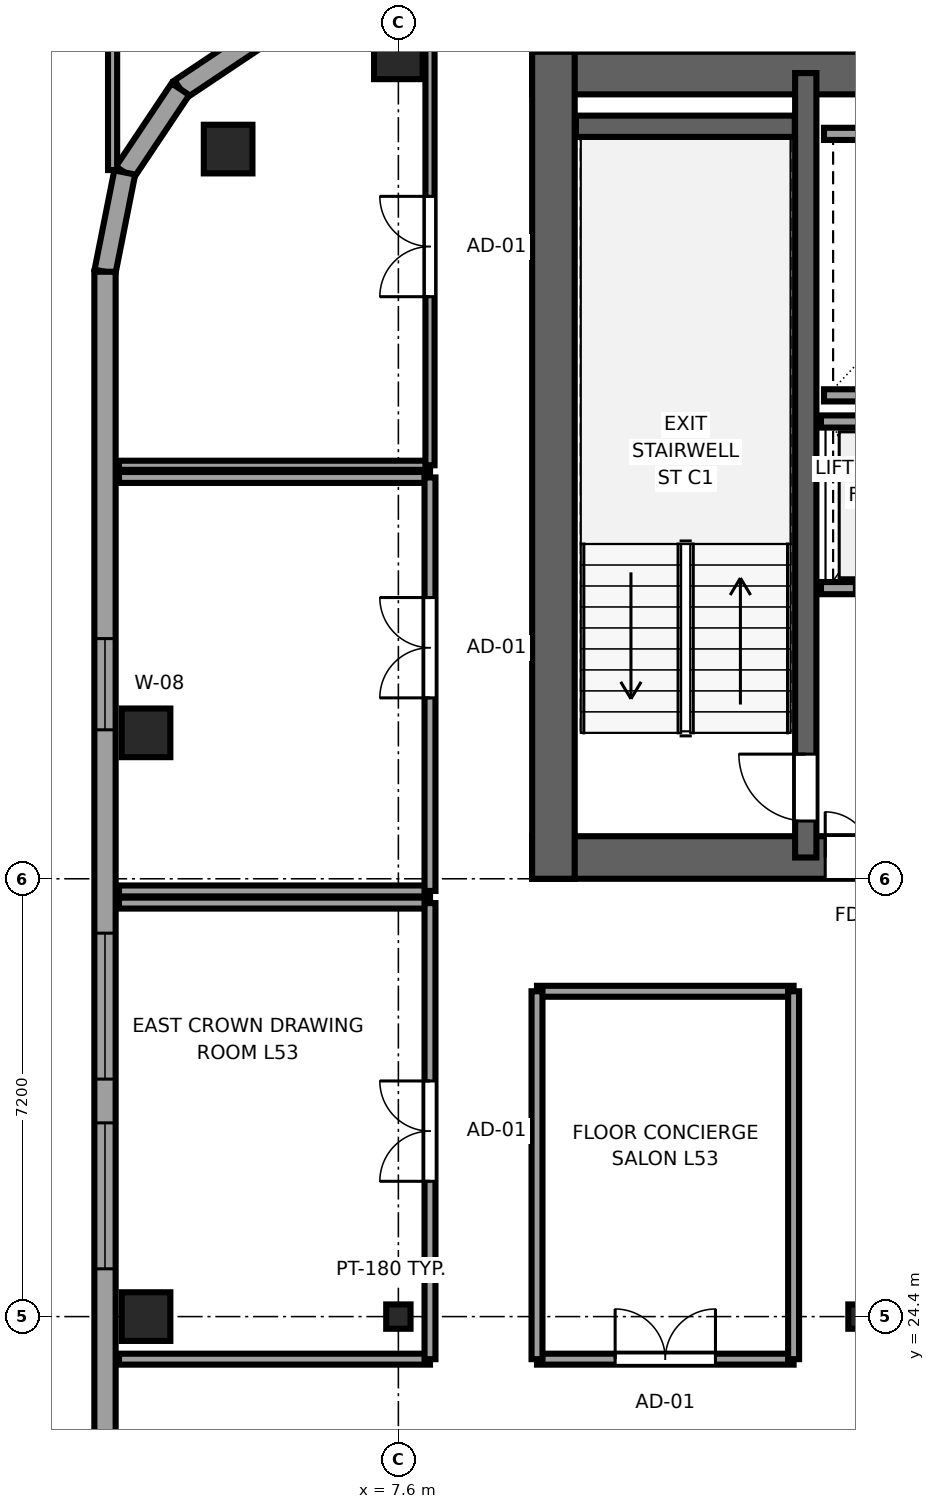
"""IFC4 building model, lengths in metres.
Left out: names, types, materials, properties, quantities, classifications, styles, units other than length and angle.
Written with IfcOpenShell. Run it as: python <this file> out.ifc"""

import sys

from ifc_helpers import new_model, si_unit, direction, frame, frame_2d, origin, origin_2d, place, context, subcontext, project, spatial, rectangle, i_section, extrude, source, transform, mapped, element, fill, save


model = new_model("IFC4")
c1 = context("Model", 3, precision=1e-05, world=origin(), true_north=direction((0.0, 1.0)))
c2 = subcontext(c1, "Body", "Model", "MODEL_VIEW")
j1 = project(units=[si_unit("LENGTHUNIT", "METRE"), si_unit("PLANEANGLEUNIT", "RADIAN")], contexts=[c1])
p1 = place(None, origin())
s1 = spatial("IfcSite", under=j1, at=p1, CompositionType="ELEMENT")
p2 = place(p1, origin())
s2 = spatial("IfcBuilding", under=s1, at=p2, CompositionType="ELEMENT")
p3 = place(p2, frame((0.0, 0.0, 201.75)))
s3 = spatial("IfcBuildingStorey", under=s2, at=p3, CompositionType="ELEMENT", Elevation=201.75)
p4 = place(p3, frame((9.8, 31.95, 0.0), z_axis=(0.0, 0.0, 1.0), x_axis=(1.0, 0.0, 0.0)))
e1 = element("IfcWall", 1, at=p4, inside=s3, PredefinedType="SHEAR", context=c2, shape_type="SweptSolid", body=[
    extrude(rectangle(XDim=26.4, YDim=0.7, at=frame_2d((13.2, 0.0))), origin(), (0.0, 0.0, 1.0), 3.55),
])
p5 = place(p4, frame((6.32, 0.0, 0.0), z_axis=(0.0, 0.0, 1.0), x_axis=(-1.0, 0.0, 0.0)))
e2 = element("IfcOpeningElement", 2, at=p5, cuts=e1, PredefinedType="OPENING", context=c2, shape_type="SweptSolid", body=[
    extrude(rectangle(XDim=1.5, YDim=2.04, at=frame_2d((0.75, 1.02))), frame((0.0, 0.36, 0.0), z_axis=(0.0, -1.0, 0.0), x_axis=(1.0, 0.0, 0.0)), (0.0, 0.0, 1.0), 0.72),
])
p6 = place(p4, frame((13.95, 0.0, 0.0), z_axis=(0.0, 0.0, 1.0), x_axis=(-1.0, 0.0, 0.0)))
e3 = element("IfcOpeningElement", 3, at=p6, cuts=e1, PredefinedType="OPENING", context=c2, shape_type="SweptSolid", body=[
    extrude(rectangle(XDim=1.5, YDim=2.04, at=frame_2d((0.75, 1.02))), frame((0.0, 0.36, 0.0), z_axis=(0.0, -1.0, 0.0), x_axis=(1.0, 0.0, 0.0)), (0.0, 0.0, 1.0), 0.72),
])
p7 = place(p4, frame((21.58, 0.0, 0.0), z_axis=(0.0, 0.0, 1.0), x_axis=(-1.0, 0.0, 0.0)))
e4 = element("IfcOpeningElement", 4, at=p7, cuts=e1, PredefinedType="OPENING", context=c2, shape_type="SweptSolid", body=[
    extrude(rectangle(XDim=1.5, YDim=2.04, at=frame_2d((0.75, 1.02))), frame((0.0, 0.36, 0.0), z_axis=(0.0, -1.0, 0.0), x_axis=(1.0, 0.0, 0.0)), (0.0, 0.0, 1.0), 0.72),
])
p8 = place(p4, frame((8.37, 0.0, 0.0), z_axis=(0.0, 0.0, 1.0), x_axis=(-1.0, 0.0, 0.0)))
e5 = element("IfcOpeningElement", 5, at=p8, cuts=e1, PredefinedType="OPENING", context=c2, shape_type="SweptSolid", body=[
    extrude(rectangle(XDim=0.82, YDim=2.01, at=frame_2d((0.41, 1.005))), frame((0.0, 0.36, 0.0), z_axis=(0.0, -1.0, 0.0), x_axis=(1.0, 0.0, 0.0)), (0.0, 0.0, 1.0), 0.72),
])
p9 = place(p4, frame((18.87, 0.0, 0.0), z_axis=(0.0, 0.0, 1.0), x_axis=(-1.0, 0.0, 0.0)))
e6 = element("IfcOpeningElement", 6, at=p9, cuts=e1, PredefinedType="OPENING", context=c2, shape_type="SweptSolid", body=[
    extrude(rectangle(XDim=0.82, YDim=2.01, at=frame_2d((0.41, 1.005))), frame((0.0, 0.36, 0.0), z_axis=(0.0, -1.0, 0.0), x_axis=(1.0, 0.0, 0.0)), (0.0, 0.0, 1.0), 0.72),
])
p10 = place(p3, frame((9.8, 44.85, 0.0), z_axis=(0.0, 0.0, 1.0), x_axis=(1.0, 0.0, 0.0)))
e7 = element("IfcWall", 7, at=p10, inside=s3, PredefinedType="SHEAR", context=c2, shape_type="SweptSolid", body=[
    extrude(rectangle(XDim=26.4, YDim=0.7, at=frame_2d((13.2, 0.0))), origin(), (0.0, 0.0, 1.0), 3.55),
])
p11 = place(p3, frame((10.15, 31.6, 0.0), z_axis=(0.0, 0.0, 1.0), x_axis=(0.0, 1.0, 0.0)))
e8 = element("IfcWall", 8, at=p11, inside=s3, PredefinedType="SHEAR", context=c2, shape_type="SweptSolid", body=[
    extrude(rectangle(XDim=13.6, YDim=0.7, at=frame_2d((6.8, 0.0))), origin(), (0.0, 0.0, 1.0), 3.55),
])
p12 = place(p3, frame((14.3, 31.95, 0.0), z_axis=(0.0, 0.0, 1.0), x_axis=(0.0, 1.0, 0.0)))
e9 = element("IfcWall", 9, at=p12, inside=s3, PredefinedType="SHEAR", context=c2, shape_type="SweptSolid", body=[
    extrude(rectangle(XDim=12.9, YDim=0.35, at=frame_2d((6.45, 0.0))), origin(), (0.0, 0.0, 1.0), 3.55),
])
p13 = place(p12, frame((0.6, 0.0, 0.0)))
e10 = element("IfcOpeningElement", 10, at=p13, cuts=e9, PredefinedType="OPENING", context=c2, shape_type="SweptSolid", body=[
    extrude(rectangle(XDim=1.1, YDim=2.12, at=frame_2d((0.55, 1.06))), frame((0.0, 0.185, 0.0), z_axis=(0.0, -1.0, 0.0), x_axis=(1.0, 0.0, 0.0)), (0.0, 0.0, 1.0), 0.37),
])
p14 = place(p3, frame((10.52, 43.975, 0.0), z_axis=(0.0, 0.0, 1.0), x_axis=(1.0, 0.0, 0.0)))
e11 = element("IfcWall", 11, at=p14, inside=s3, PredefinedType="SHEAR", context=c2, shape_type="SweptSolid", body=[
    extrude(rectangle(XDim=3.6, YDim=0.35, at=frame_2d((1.8, 0.0))), origin(), (0.0, 0.0, 1.0), 3.55),
])
m1 = source(origin(), c2, "Body", "SweptSolid", [
    extrude(rectangle(XDim=0.8, YDim=0.8, at=origin_2d()), origin(), (0.0, 0.0, 1.0), 3.55),
])
p15 = place(p3, frame((3.45, 24.4, 0.0), z_axis=(0.0, 0.0, 1.0), x_axis=(1.0, 0.0, 0.0)))
e12 = element("IfcColumn", 12, at=p15, inside=s3, PredefinedType="COLUMN", context=c2, shape_type="MappedRepresentation", body=[
    mapped(m1, transform((0.0, 0.0, 0.0), x_axis=(1.0, 0.0, 0.0), y_axis=(0.0, 1.0, 0.0), z_axis=(0.0, 0.0, 1.0), scale=1.0)),
])
m2 = source(origin(), c2, "Body", "SweptSolid", [
    extrude(i_section(OverallWidth=0.4, OverallDepth=0.4, WebThickness=0.02, FlangeThickness=0.035, at=origin_2d()), origin(), (0.0, 0.0, 1.0), 3.55),
])
for number, where, z_axis, x_axis in (
    (13, (7.6, 24.4, 0.0), (0.0, 0.0, 1.0), (1.0, 0.0, 0.0)),
    (14, (15.2, 24.4, 0.0), (0.0, 0.0, 1.0), (1.0, 0.0, 0.0)),
):
    element("IfcColumn", number, at=place(p3, frame(where, z_axis=z_axis, x_axis=x_axis)), inside=s3, PredefinedType="COLUMN", context=c2, shape_type="MappedRepresentation", body=[
        mapped(m2, transform((0.0, 0.0, 0.0), x_axis=(1.0, 0.0, 0.0), y_axis=(0.0, 1.0, 0.0), z_axis=(0.0, 0.0, 1.0), scale=1.0)),
    ])
for number, where, z_axis, x_axis in (
    (15, (4.8, 43.6, 0.0), (0.0, 0.0, 1.0), (1.0, 0.0, 0.0)),
    (16, (7.6, 45.15, 0.0), (0.0, 0.0, 1.0), (1.0, 0.0, 0.0)),
    (17, (3.45, 34.0, 0.0), (0.0, 0.0, 1.0), (1.0, 0.0, 0.0)),
):
    element("IfcColumn", number, at=place(p3, frame(where, z_axis=z_axis, x_axis=x_axis)), inside=s3, PredefinedType="COLUMN", context=c2, shape_type="MappedRepresentation", body=[
        mapped(m1, transform((0.0, 0.0, 0.0), x_axis=(1.0, 0.0, 0.0), y_axis=(0.0, 1.0, 0.0), z_axis=(0.0, 0.0, 1.0), scale=1.0)),
    ])
for number, where, z_axis, x_axis in (
    (18, (5.385, 45.5, 0.0), (0.0, 0.0, 1.0), (-0.832, -0.556, 0.0)),
    (19, (4.015, 44.585, 0.0), (0.0, 0.0, 1.0), (-0.556, -0.831, 0.0)),
):
    element("IfcWall", number, at=place(p3, frame(where, z_axis=z_axis, x_axis=x_axis)), inside=s3, PredefinedType="SOLIDWALL", context=c2, shape_type="SweptSolid", body=[
        extrude(rectangle(XDim=1.647, YDim=0.35, at=frame_2d((0.824, 0.0))), origin(), (0.0, 0.0, 1.0), 2.752),
    ])
p16 = place(p3, frame((3.1, 43.216, 0.0), z_axis=(0.0, 0.0, 1.0), x_axis=(-0.195044345786, -0.980794424524, 0.0)))
e20 = element("IfcWall", 20, at=p16, inside=s3, PredefinedType="SOLIDWALL", context=c2, shape_type="SweptSolid", body=[
    extrude(rectangle(XDim=1.665, YDim=0.35, at=frame_2d((0.833, 0.0))), origin(), (0.0, 0.0, 1.0), 3.29),
])
p17 = place(p3, frame((2.775, 41.583, 0.0), z_axis=(0.0, 0.0, 1.0), x_axis=(0.0, -1.0, 0.0)))
e21 = element("IfcWall", 21, at=p17, inside=s3, PredefinedType="SOLIDWALL", context=c2, shape_type="SweptSolid", body=[
    extrude(rectangle(XDim=34.566, YDim=0.35, at=frame_2d((17.283, 0.0))), origin(), (0.0, 0.0, 1.0), 3.29),
])
p18 = place(p17, frame((10.877, 0.0, 0.68)))
e22 = element("IfcOpeningElement", 22, at=p18, cuts=e21, PredefinedType="OPENING", context=c2, shape_type="SweptSolid", body=[
    extrude(rectangle(XDim=2.4, YDim=1.9, at=frame_2d((1.2, 0.95))), frame((0.0, 0.185, 0.0), z_axis=(0.0, -1.0, 0.0), x_axis=(1.0, 0.0, 0.0)), (0.0, 0.0, 1.0), 0.37),
])
p19 = place(p17, frame((13.997, 0.0, 0.68)))
e23 = element("IfcOpeningElement", 23, at=p19, cuts=e21, PredefinedType="OPENING", context=c2, shape_type="SweptSolid", body=[
    extrude(rectangle(XDim=2.4, YDim=1.9, at=frame_2d((1.2, 0.95))), frame((0.0, 0.185, 0.0), z_axis=(0.0, -1.0, 0.0), x_axis=(1.0, 0.0, 0.0)), (0.0, 0.0, 1.0), 0.37),
])
p20 = place(p17, frame((22.339, 0.0, 0.68)))
e24 = element("IfcOpeningElement", 24, at=p20, cuts=e21, PredefinedType="OPENING", context=c2, shape_type="SweptSolid", body=[
    extrude(rectangle(XDim=2.4, YDim=1.9, at=frame_2d((1.2, 0.95))), frame((0.0, 0.185, 0.0), z_axis=(0.0, -1.0, 0.0), x_axis=(1.0, 0.0, 0.0)), (0.0, 0.0, 1.0), 0.37),
])
p21 = place(p17, frame((26.51, 0.0, 0.68)))
e25 = element("IfcOpeningElement", 25, at=p21, cuts=e21, PredefinedType="OPENING", context=c2, shape_type="SweptSolid", body=[
    extrude(rectangle(XDim=2.4, YDim=1.9, at=frame_2d((1.2, 0.95))), frame((0.0, 0.185, 0.0), z_axis=(0.0, -1.0, 0.0), x_axis=(1.0, 0.0, 0.0)), (0.0, 0.0, 1.0), 0.37),
])
p22 = place(p17, frame((30.13, 0.0, 0.68)))
e26 = element("IfcOpeningElement", 26, at=p22, cuts=e21, PredefinedType="OPENING", context=c2, shape_type="SweptSolid", body=[
    extrude(rectangle(XDim=2.4, YDim=1.9, at=frame_2d((1.2, 0.95))), frame((0.0, 0.185, 0.0), z_axis=(0.0, -1.0, 0.0), x_axis=(1.0, 0.0, 0.0)), (0.0, 0.0, 1.0), 0.37),
])
p23 = place(p17, frame((6.033, 0.0, 0.62)))
e27 = element("IfcOpeningElement", 27, at=p23, cuts=e21, PredefinedType="OPENING", context=c2, shape_type="SweptSolid", body=[
    extrude(rectangle(XDim=1.5, YDim=1.55, at=frame_2d((0.75, 0.775))), frame((0.0, 0.185, 0.0), z_axis=(0.0, -1.0, 0.0), x_axis=(1.0, 0.0, 0.0)), (0.0, 0.0, 1.0), 0.37),
])
for number, where, z_axis, x_axis in (
    (28, (14.6, 39.55, 0.0), (0.0, 0.0, 1.0), (1.0, 0.0, 0.0)),
    (29, (14.6, 43.85, 0.0), (0.0, 0.0, 1.0), (1.0, 0.0, 0.0)),
):
    element("IfcWall", number, at=place(p3, frame(where, z_axis=z_axis, x_axis=x_axis)), inside=s3, PredefinedType="SOLIDWALL", context=c2, shape_type="SweptSolid", body=[
        extrude(rectangle(XDim=4.1, YDim=0.2, at=frame_2d((2.05, 0.0))), origin(), (0.0, 0.0, 1.0), 3.29),
    ])
p24 = place(p3, frame((14.55, 36.38, 0.0), z_axis=(0.0, 0.0, 1.0), x_axis=(1.0, 0.0, 0.0)))
e30 = element("IfcWall", 30, at=p24, inside=s3, PredefinedType="SOLIDWALL", context=c2, shape_type="SweptSolid", body=[
    extrude(rectangle(XDim=4.075, YDim=0.2, at=frame_2d((2.038, 0.0))), origin(), (0.0, 0.0, 1.0), 3.29),
])
p25 = place(p24, frame((0.55, 0.0, 0.0)))
e31 = element("IfcOpeningElement", 31, at=p25, cuts=e30, PredefinedType="OPENING", context=c2, shape_type="SweptSolid", body=[
    extrude(rectangle(XDim=1.1, YDim=2.12, at=frame_2d((0.55, 1.06))), frame((0.0, 0.11, 0.0), z_axis=(0.0, -1.0, 0.0), x_axis=(1.0, 0.0, 0.0)), (0.0, 0.0, 1.0), 0.22),
])
p26 = place(p24, frame((2.45, 0.0, 0.0)))
e32 = element("IfcOpeningElement", 32, at=p26, cuts=e30, PredefinedType="OPENING", context=c2, shape_type="SweptSolid", body=[
    extrude(rectangle(XDim=1.1, YDim=2.12, at=frame_2d((0.55, 1.06))), frame((0.0, 0.11, 0.0), z_axis=(0.0, -1.0, 0.0), x_axis=(1.0, 0.0, 0.0)), (0.0, 0.0, 1.0), 0.22),
])
p27 = place(p3, frame((14.55, 39.12, 0.0), z_axis=(0.0, 0.0, 1.0), x_axis=(1.0, 0.0, 0.0)))
e33 = element("IfcWall", 33, at=p27, inside=s3, PredefinedType="SOLIDWALL", context=c2, shape_type="SweptSolid", body=[
    extrude(rectangle(XDim=4.075, YDim=0.2, at=frame_2d((2.038, 0.0))), origin(), (0.0, 0.0, 1.0), 3.29),
])
for number, where, z_axis, x_axis in (
    (34, (3.005, 23.7, 0.0), (0.0, 0.0, 1.0), (1.0, 0.0, 0.0)),
    (35, (3.005, 31.2, 0.0), (0.0, 0.0, 1.0), (1.0, 0.0, 0.0)),
):
    element("IfcWall", number, at=place(p3, frame(where, z_axis=z_axis, x_axis=x_axis)), inside=s3, PredefinedType="PARTITIONING", context=c2, shape_type="SweptSolid", body=[
        extrude(rectangle(XDim=5.115, YDim=0.18, at=frame_2d((2.558, 0.0))), origin(), (0.0, 0.0, 1.0), 3.29),
    ])
p28 = place(p3, frame((8.12, 23.7, 0.0), z_axis=(0.0, 0.0, 1.0), x_axis=(0.0, 1.0, 0.0)))
e36 = element("IfcWall", 36, at=p28, inside=s3, PredefinedType="PARTITIONING", context=c2, shape_type="SweptSolid", body=[
    extrude(rectangle(XDim=7.5, YDim=0.18, at=frame_2d((3.75, 0.0))), origin(), (0.0, 0.0, 1.0), 3.29),
])
p29 = place(p28, frame((2.925, 0.0, 0.0)))
e37 = element("IfcOpeningElement", 37, at=p29, cuts=e36, PredefinedType="OPENING", context=c2, shape_type="SweptSolid", body=[
    extrude(rectangle(XDim=1.65, YDim=2.15, at=frame_2d((0.825, 1.075))), frame((0.0, 0.1, 0.0), z_axis=(0.0, -1.0, 0.0), x_axis=(1.0, 0.0, 0.0)), (0.0, 0.0, 1.0), 0.2),
])
for number, where, z_axis, x_axis in (
    (38, (3.005, 31.4, 0.0), (0.0, 0.0, 1.0), (1.0, 0.0, 0.0)),
    (39, (3.005, 38.2, 0.0), (0.0, 0.0, 1.0), (1.0, 0.0, 0.0)),
):
    element("IfcWall", number, at=place(p3, frame(where, z_axis=z_axis, x_axis=x_axis)), inside=s3, PredefinedType="PARTITIONING", context=c2, shape_type="SweptSolid", body=[
        extrude(rectangle(XDim=5.115, YDim=0.18, at=frame_2d((2.558, 0.0))), origin(), (0.0, 0.0, 1.0), 3.29),
    ])
p30 = place(p3, frame((8.12, 31.4, 0.0), z_axis=(0.0, 0.0, 1.0), x_axis=(0.0, 1.0, 0.0)))
e40 = element("IfcWall", 40, at=p30, inside=s3, PredefinedType="PARTITIONING", context=c2, shape_type="SweptSolid", body=[
    extrude(rectangle(XDim=6.8, YDim=0.18, at=frame_2d((3.4, 0.0))), origin(), (0.0, 0.0, 1.0), 3.29),
])
p31 = place(p30, frame((3.175, 0.0, 0.0)))
e41 = element("IfcOpeningElement", 41, at=p31, cuts=e40, PredefinedType="OPENING", context=c2, shape_type="SweptSolid", body=[
    extrude(rectangle(XDim=1.65, YDim=2.15, at=frame_2d((0.825, 1.075))), frame((0.0, 0.1, 0.0), z_axis=(0.0, -1.0, 0.0), x_axis=(1.0, 0.0, 0.0)), (0.0, 0.0, 1.0), 0.2),
])
p32 = place(p3, frame((3.005, 38.4, 0.0), z_axis=(0.0, 0.0, 1.0), x_axis=(1.0, 0.0, 0.0)))
e42 = element("IfcWall", 42, at=p32, inside=s3, PredefinedType="PARTITIONING", context=c2, shape_type="SweptSolid", body=[
    extrude(rectangle(XDim=5.115, YDim=0.15, at=frame_2d((2.558, 0.0))), origin(), (0.0, 0.0, 1.0), 3.29),
])
p33 = place(p3, frame((2.9, 43.255, 0.0), z_axis=(0.0, 0.0, 1.0), x_axis=(0.0, 1.0, 0.0)))
e43 = element("IfcWall", 43, at=p33, inside=s3, PredefinedType="PARTITIONING", context=c2, shape_type="SweptSolid", body=[
    extrude(rectangle(XDim=2.445, YDim=0.15, at=frame_2d((1.223, 0.0))), origin(), (0.0, 0.0, 1.0), 3.29),
])
p34 = place(p3, frame((8.12, 38.4, 0.0), z_axis=(0.0, 0.0, 1.0), x_axis=(0.0, 1.0, 0.0)))
e44 = element("IfcWall", 44, at=p34, inside=s3, PredefinedType="PARTITIONING", context=c2, shape_type="SweptSolid", body=[
    extrude(rectangle(XDim=7.195, YDim=0.15, at=frame_2d((3.598, 0.0))), origin(), (0.0, 0.0, 1.0), 3.29),
])
p35 = place(p34, frame((2.772, 0.0, 0.0)))
e45 = element("IfcOpeningElement", 45, at=p35, cuts=e44, PredefinedType="OPENING", context=c2, shape_type="SweptSolid", body=[
    extrude(rectangle(XDim=1.65, YDim=2.15, at=frame_2d((0.825, 1.075))), frame((0.0, 0.085, 0.0), z_axis=(0.0, -1.0, 0.0), x_axis=(1.0, 0.0, 0.0)), (0.0, 0.0, 1.0), 0.17),
])
p36 = place(p3, frame((9.88, 23.7, 0.0), z_axis=(0.0, 0.0, 1.0), x_axis=(1.0, 0.0, 0.0)))
e46 = element("IfcWall", 46, at=p36, inside=s3, PredefinedType="PARTITIONING", context=c2, shape_type="SweptSolid", body=[
    extrude(rectangle(XDim=4.22, YDim=0.18, at=frame_2d((2.11, 0.0))), origin(), (0.0, 0.0, 1.0), 3.29),
])
p37 = place(p36, frame((1.285, 0.0, 0.0)))
e47 = element("IfcOpeningElement", 47, at=p37, cuts=e46, PredefinedType="OPENING", context=c2, shape_type="SweptSolid", body=[
    extrude(rectangle(XDim=1.65, YDim=2.15, at=frame_2d((0.825, 1.075))), frame((0.0, 0.1, 0.0), z_axis=(0.0, -1.0, 0.0), x_axis=(1.0, 0.0, 0.0)), (0.0, 0.0, 1.0), 0.2),
])
p38 = place(p3, frame((9.88, 29.75, 0.0), z_axis=(0.0, 0.0, 1.0), x_axis=(1.0, 0.0, 0.0)))
e48 = element("IfcWall", 48, at=p38, inside=s3, PredefinedType="PARTITIONING", context=c2, shape_type="SweptSolid", body=[
    extrude(rectangle(XDim=4.22, YDim=0.18, at=frame_2d((2.11, 0.0))), origin(), (0.0, 0.0, 1.0), 3.29),
])
for number, where, z_axis, x_axis in (
    (49, (9.88, 23.7, 0.0), (0.0, 0.0, 1.0), (0.0, 1.0, 0.0)),
    (50, (14.1, 23.7, 0.0), (0.0, 0.0, 1.0), (0.0, 1.0, 0.0)),
):
    element("IfcWall", number, at=place(p3, frame(where, z_axis=z_axis, x_axis=x_axis)), inside=s3, PredefinedType="PARTITIONING", context=c2, shape_type="SweptSolid", body=[
        extrude(rectangle(XDim=6.05, YDim=0.18, at=frame_2d((3.025, 0.0))), origin(), (0.0, 0.0, 1.0), 3.29),
    ])
m3 = source(origin(), c2, "Body", "SweptSolid", [
    extrude(rectangle(XDim=2.4, YDim=1.9, at=frame_2d((1.2, 0.95))), frame((0.0, 0.09, 0.0), z_axis=(0.0, -1.0, 0.0), x_axis=(1.0, 0.0, 0.0)), (0.0, 0.0, 1.0), 0.06),
])
p39 = place(p18, origin())
e51 = element("IfcWindow", 51, at=p39, inside=s3, PartitioningType="TRIPLE_PANEL_HORIZONTAL", PredefinedType="WINDOW", context=c2, shape_type="MappedRepresentation", body=[
    mapped(m3, transform((0.0, 0.0, 0.0), x_axis=(1.0, 0.0, 0.0), y_axis=(0.0, 1.0, 0.0), z_axis=(0.0, 0.0, 1.0), scale=1.0)),
])
fill(e22, e51)
p40 = place(p19, origin())
e52 = element("IfcWindow", 52, at=p40, inside=s3, PartitioningType="TRIPLE_PANEL_HORIZONTAL", PredefinedType="WINDOW", context=c2, shape_type="MappedRepresentation", body=[
    mapped(m3, transform((0.0, 0.0, 0.0), x_axis=(1.0, 0.0, 0.0), y_axis=(0.0, 1.0, 0.0), z_axis=(0.0, 0.0, 1.0), scale=1.0)),
])
fill(e23, e52)
m4 = source(origin(), c2, "Body", "SweptSolid", [
    extrude(rectangle(XDim=1.5, YDim=1.55, at=frame_2d((0.75, 0.775))), frame((0.0, 0.09, 0.0), z_axis=(0.0, -1.0, 0.0), x_axis=(1.0, 0.0, 0.0)), (0.0, 0.0, 1.0), 0.06),
])
p41 = place(p23, origin())
e53 = element("IfcWindow", 53, at=p41, inside=s3, PartitioningType="SINGLE_PANEL", PredefinedType="WINDOW", context=c2, shape_type="MappedRepresentation", body=[
    mapped(m4, transform((0.0, 0.0, 0.0), x_axis=(1.0, 0.0, 0.0), y_axis=(0.0, 1.0, 0.0), z_axis=(0.0, 0.0, 1.0), scale=1.0)),
])
fill(e27, e53)
m5 = source(origin(), c2, "Body", "SweptSolid", [
    extrude(rectangle(XDim=1.1, YDim=2.12, at=frame_2d((0.55, 1.06))), frame((0.0, 0.025, 0.0), z_axis=(0.0, -1.0, 0.0), x_axis=(1.0, 0.0, 0.0)), (0.0, 0.0, 1.0), 0.05),
])
p42 = place(p13, origin())
e54 = element("IfcDoor", 54, at=p42, inside=s3, OperationType="SINGLE_SWING_RIGHT", PredefinedType="DOOR", context=c2, shape_type="MappedRepresentation", body=[
    mapped(m5, transform((0.0, 0.0, 0.0), x_axis=(1.0, 0.0, 0.0), y_axis=(0.0, 1.0, 0.0), z_axis=(0.0, 0.0, 1.0), scale=1.0)),
])
fill(e10, e54)
m6 = source(origin(), c2, "Body", "SweptSolid", [
    extrude(rectangle(XDim=1.5, YDim=2.04, at=frame_2d((0.75, 1.02))), frame((0.0, 0.025, 0.0), z_axis=(0.0, -1.0, 0.0), x_axis=(1.0, 0.0, 0.0)), (0.0, 0.0, 1.0), 0.05),
])
p43 = place(p5, origin())
e55 = element("IfcDoor", 55, at=p43, inside=s3, OperationType="DOUBLE_DOOR_SINGLE_SWING", PredefinedType="DOOR", context=c2, shape_type="MappedRepresentation", body=[
    mapped(m6, transform((0.0, 0.0, 0.0), x_axis=(1.0, 0.0, 0.0), y_axis=(0.0, 1.0, 0.0), z_axis=(0.0, 0.0, 1.0), scale=1.0)),
])
fill(e2, e55)
m7 = source(origin(), c2, "Body", "SweptSolid", [
    extrude(rectangle(XDim=1.65, YDim=2.15, at=frame_2d((0.825, 1.075))), frame((0.0, 0.025, 0.0), z_axis=(0.0, -1.0, 0.0), x_axis=(1.0, 0.0, 0.0)), (0.0, 0.0, 1.0), 0.05),
])
p44 = place(p29, origin())
e56 = element("IfcDoor", 56, at=p44, inside=s3, OperationType="DOUBLE_DOOR_SINGLE_SWING", PredefinedType="DOOR", context=c2, shape_type="MappedRepresentation", body=[
    mapped(m7, transform((0.0, 0.0, 0.0), x_axis=(1.0, 0.0, 0.0), y_axis=(0.0, 1.0, 0.0), z_axis=(0.0, 0.0, 1.0), scale=1.0)),
])
fill(e37, e56)
p45 = place(p31, origin())
e57 = element("IfcDoor", 57, at=p45, inside=s3, OperationType="DOUBLE_DOOR_SINGLE_SWING", PredefinedType="DOOR", context=c2, shape_type="MappedRepresentation", body=[
    mapped(m7, transform((0.0, 0.0, 0.0), x_axis=(1.0, 0.0, 0.0), y_axis=(0.0, 1.0, 0.0), z_axis=(0.0, 0.0, 1.0), scale=1.0)),
])
fill(e41, e57)
p46 = place(p35, origin())
e58 = element("IfcDoor", 58, at=p46, inside=s3, OperationType="DOUBLE_DOOR_SINGLE_SWING", PredefinedType="DOOR", context=c2, shape_type="MappedRepresentation", body=[
    mapped(m7, transform((0.0, 0.0, 0.0), x_axis=(1.0, 0.0, 0.0), y_axis=(0.0, 1.0, 0.0), z_axis=(0.0, 0.0, 1.0), scale=1.0)),
])
fill(e45, e58)
p47 = place(p37, origin())
e59 = element("IfcDoor", 59, at=p47, inside=s3, OperationType="DOUBLE_DOOR_SINGLE_SWING", PredefinedType="DOOR", context=c2, shape_type="MappedRepresentation", body=[
    mapped(m7, transform((0.0, 0.0, 0.0), x_axis=(1.0, 0.0, 0.0), y_axis=(0.0, 1.0, 0.0), z_axis=(0.0, 0.0, 1.0), scale=1.0)),
])
fill(e47, e59)
save(model, sys.argv[1])
